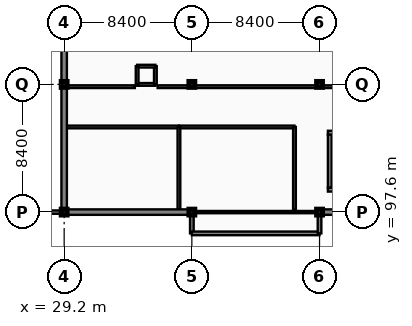
"""IFC4 building model, lengths in metres.
Left out: names, types, materials, properties, quantities, classifications, styles, units other than length and angle.
Written with IfcOpenShell. Run it as: python <this file> out.ifc"""

import sys

from ifc_helpers import new_model, si_unit, direction, frame, frame_2d, origin, origin_2d, place, context, subcontext, project, spatial, rectangle, extrude, element, fill, save


model = new_model("IFC4")
c1 = context("Model", 3, precision=1e-05, world=origin(), true_north=direction((0.0, 1.0)))
c2 = subcontext(c1, "Body", "Model", "MODEL_VIEW")
j1 = project(units=[si_unit("LENGTHUNIT", "METRE"), si_unit("PLANEANGLEUNIT", "RADIAN")], contexts=[c1])
p1 = place(None, origin())
s1 = spatial("IfcSite", under=j1, at=p1, CompositionType="ELEMENT")
p2 = place(p1, origin())
s2 = spatial("IfcBuilding", under=s1, at=p2, CompositionType="ELEMENT")
p3 = place(p2, frame((0.0, 0.0, 13.8)))
s3 = spatial("IfcBuildingStorey", under=s2, at=p3, CompositionType="ELEMENT", Elevation=13.8)
for number, where, z_axis, x_axis in (
    (1, (29.2, 97.6, 0.0), (0.0, 0.0, 1.0), (1.0, 0.0, 0.0)),
    (2, (29.2, 106.0, 0.0), (0.0, 0.0, 1.0), (1.0, 0.0, 0.0)),
    (3, (37.6, 97.6, 0.0), (0.0, 0.0, 1.0), (1.0, 0.0, 0.0)),
    (4, (37.6, 106.0, 0.0), (0.0, 0.0, 1.0), (1.0, 0.0, 0.0)),
    (5, (46.0, 97.6, 0.0), (0.0, 0.0, 1.0), (1.0, 0.0, 0.0)),
    (6, (46.0, 106.0, 0.0), (0.0, 0.0, 1.0), (1.0, 0.0, 0.0)),
):
    element("IfcColumn", number, at=place(p3, frame(where, z_axis=z_axis, x_axis=x_axis)), inside=s3, PredefinedType="COLUMN", context=c2, shape_type="SweptSolid", body=[
        extrude(rectangle(XDim=0.4, YDim=0.4, at=origin_2d()), origin(), (0.0, 0.0, 1.0), 3.9),
    ])
p4 = place(p3, frame((29.34, 103.2, 0.0), z_axis=(0.0, 0.0, 1.0), x_axis=(1.0, 0.0, 0.0)))
e7 = element("IfcWall", 7, at=p4, inside=s3, PredefinedType="PARTITIONING", context=c2, shape_type="SweptSolid", body=[
    extrude(rectangle(XDim=7.41, YDim=0.18, at=frame_2d((3.705, 0.0))), origin(), (0.0, 0.0, 1.0), 3.09),
])
p5 = place(p4, frame((3.205, 0.0, -0.01)))
e8 = element("IfcOpeningElement", 8, at=p5, cuts=e7, PredefinedType="OPENING", context=c2, shape_type="SweptSolid", body=[
    extrude(rectangle(XDim=1.0, YDim=2.16, at=frame_2d((0.5, 1.08))), frame((0.0, 0.1, 0.0), z_axis=(0.0, -1.0, 0.0), x_axis=(1.0, 0.0, 0.0)), (0.0, 0.0, 1.0), 0.2),
])
p6 = place(p3, frame((36.75, 103.2, 0.0), z_axis=(0.0, 0.0, 1.0), x_axis=(1.0, 0.0, 0.0)))
e9 = element("IfcWall", 9, at=p6, inside=s3, PredefinedType="PARTITIONING", context=c2, shape_type="SweptSolid", body=[
    extrude(rectangle(XDim=7.6, YDim=0.18, at=frame_2d((3.8, 0.0))), origin(), (0.0, 0.0, 1.0), 3.31),
])
p7 = place(p6, frame((3.3, 0.0, -0.01)))
e10 = element("IfcOpeningElement", 10, at=p7, cuts=e9, PredefinedType="OPENING", context=c2, shape_type="SweptSolid", body=[
    extrude(rectangle(XDim=1.0, YDim=2.16, at=frame_2d((0.5, 1.08))), frame((0.0, 0.1, 0.0), z_axis=(0.0, -1.0, 0.0), x_axis=(1.0, 0.0, 0.0)), (0.0, 0.0, 1.0), 0.2),
])
p8 = place(p3, frame((36.75, 97.74, 0.0), z_axis=(0.0, 0.0, 1.0), x_axis=(0.0, 1.0, 0.0)))
e11 = element("IfcWall", 11, at=p8, inside=s3, PredefinedType="PARTITIONING", context=c2, shape_type="SweptSolid", body=[
    extrude(rectangle(XDim=5.46, YDim=0.18, at=frame_2d((2.73, 0.0))), origin(), (0.0, 0.0, 1.0), 3.01),
])
p9 = place(p3, frame((44.35, 97.74, 0.0), z_axis=(0.0, 0.0, 1.0), x_axis=(0.0, 1.0, 0.0)))
e12 = element("IfcWall", 12, at=p9, inside=s3, PredefinedType="PARTITIONING", context=c2, shape_type="SweptSolid", body=[
    extrude(rectangle(XDim=5.46, YDim=0.18, at=frame_2d((2.73, 0.0))), origin(), (0.0, 0.0, 1.0), 3.37),
])
p10 = place(p3, frame((37.6, 97.6, 0.0), z_axis=(0.0, 0.0, 1.0), x_axis=(1.0, 0.0, 0.0)))
e13 = element("IfcWall", 13, at=p10, inside=s3, PredefinedType="PARTITIONING", context=c2, shape_type="SweptSolid", body=[
    extrude(rectangle(XDim=8.4, YDim=0.15, at=frame_2d((4.2, 0.0))), origin(), (0.0, 0.0, 1.0), 3.01),
])
p11 = place(p10, frame((2.59, 0.0, -0.01)))
e14 = element("IfcOpeningElement", 14, at=p11, cuts=e13, PredefinedType="OPENING", context=c2, shape_type="SweptSolid", body=[
    extrude(rectangle(XDim=1.0, YDim=2.16, at=frame_2d((0.5, 1.08))), frame((0.0, 0.085, 0.0), z_axis=(0.0, -1.0, 0.0), x_axis=(1.0, 0.0, 0.0)), (0.0, 0.0, 1.0), 0.17),
])
p12 = place(p3, frame((29.34, 105.85, 0.0), z_axis=(0.0, 0.0, 1.0), x_axis=(1.0, 0.0, 0.0)))
e15 = element("IfcWall", 15, at=p12, inside=s3, PredefinedType="PARTITIONING", context=c2, shape_type="SweptSolid", body=[
    extrude(rectangle(XDim=4.51, YDim=0.18, at=frame_2d((2.255, 0.0))), origin(), (0.0, 0.0, 1.0), 3.09),
])
p13 = place(p12, frame((1.31, 0.0, -0.01)))
e16 = element("IfcOpeningElement", 16, at=p13, cuts=e15, PredefinedType="OPENING", context=c2, shape_type="SweptSolid", body=[
    extrude(rectangle(XDim=1.6, YDim=2.21, at=frame_2d((0.8, 1.105))), frame((0.0, 0.1, 0.0), z_axis=(0.0, -1.0, 0.0), x_axis=(1.0, 0.0, 0.0)), (0.0, 0.0, 1.0), 0.2),
])
p14 = place(p3, frame((35.35, 105.85, 0.0), z_axis=(0.0, 0.0, 1.0), x_axis=(1.0, 0.0, 0.0)))
e17 = element("IfcWall", 17, at=p14, inside=s3, PredefinedType="PARTITIONING", context=c2, shape_type="SweptSolid", body=[
    extrude(rectangle(XDim=17.7, YDim=0.18, at=frame_2d((8.85, 0.0))), origin(), (0.0, 0.0, 1.0), 3.15),
])
p15 = place(p3, frame((29.2, 97.6, 0.0), z_axis=(0.0, 0.0, 1.0), x_axis=(1.0, 0.0, 0.0)))
e18 = element("IfcWall", 18, at=p15, inside=s3, PredefinedType="SOLIDWALL", context=c2, shape_type="SweptSolid", body=[
    extrude(rectangle(XDim=8.4, YDim=0.36, at=frame_2d((4.2, 0.0))), origin(), (0.0, 0.0, 1.0), 3.01),
])
p16 = place(p15, frame((0.46, 0.0, 0.75)))
e19 = element("IfcOpeningElement", 19, at=p16, cuts=e18, PredefinedType="OPENING", context=c2, shape_type="SweptSolid", body=[
    extrude(rectangle(XDim=1.55, YDim=2.12, at=frame_2d((0.775, 1.06))), frame((0.0, 0.19, 0.0), z_axis=(0.0, -1.0, 0.0), x_axis=(1.0, 0.0, 0.0)), (0.0, 0.0, 1.0), 0.38),
])
p17 = place(p15, frame((5.66, 0.0, 0.75)))
e20 = element("IfcOpeningElement", 20, at=p17, cuts=e18, PredefinedType="OPENING", context=c2, shape_type="SweptSolid", body=[
    extrude(rectangle(XDim=1.55, YDim=2.12, at=frame_2d((0.775, 1.06))), frame((0.0, 0.19, 0.0), z_axis=(0.0, -1.0, 0.0), x_axis=(1.0, 0.0, 0.0)), (0.0, 0.0, 1.0), 0.38),
])
p18 = place(p3, frame((46.0, 97.6, 0.0), z_axis=(0.0, 0.0, 1.0), x_axis=(1.0, 0.0, 0.0)))
e21 = element("IfcWall", 21, at=p18, inside=s3, PredefinedType="SOLIDWALL", context=c2, shape_type="SweptSolid", body=[
    extrude(rectangle(XDim=4.8, YDim=0.36, at=frame_2d((2.4, 0.0))), origin(), (0.0, 0.0, 1.0), 3.15),
])
p19 = place(p18, frame((0.46, 0.0, 0.75)))
e22 = element("IfcOpeningElement", 22, at=p19, cuts=e21, PredefinedType="OPENING", context=c2, shape_type="SweptSolid", body=[
    extrude(rectangle(XDim=1.55, YDim=2.26, at=frame_2d((0.775, 1.13))), frame((0.0, 0.19, 0.0), z_axis=(0.0, -1.0, 0.0), x_axis=(1.0, 0.0, 0.0)), (0.0, 0.0, 1.0), 0.38),
])
p20 = place(p18, frame((2.66, 0.0, 0.75)))
e23 = element("IfcOpeningElement", 23, at=p20, cuts=e21, PredefinedType="OPENING", context=c2, shape_type="SweptSolid", body=[
    extrude(rectangle(XDim=1.55, YDim=2.26, at=frame_2d((0.775, 1.13))), frame((0.0, 0.19, 0.0), z_axis=(0.0, -1.0, 0.0), x_axis=(1.0, 0.0, 0.0)), (0.0, 0.0, 1.0), 0.38),
])
p21 = place(p3, frame((29.2, 106.0, 0.0), z_axis=(0.0, 0.0, 1.0), x_axis=(0.0, -1.0, 0.0)))
e24 = element("IfcWall", 24, at=p21, inside=s3, PredefinedType="SOLIDWALL", context=c2, shape_type="SweptSolid", body=[
    extrude(rectangle(XDim=8.4, YDim=0.36, at=frame_2d((4.2, 0.0))), origin(), (0.0, 0.0, 1.0), 3.01),
])
p22 = place(p21, frame((0.46, 0.0, 0.75)))
e25 = element("IfcOpeningElement", 25, at=p22, cuts=e24, PredefinedType="OPENING", context=c2, shape_type="SweptSolid", body=[
    extrude(rectangle(XDim=1.55, YDim=2.12, at=frame_2d((0.775, 1.06))), frame((0.0, 0.19, 0.0), z_axis=(0.0, -1.0, 0.0), x_axis=(1.0, 0.0, 0.0)), (0.0, 0.0, 1.0), 0.38),
])
p23 = place(p21, frame((6.26, 0.0, 0.75)))
e26 = element("IfcOpeningElement", 26, at=p23, cuts=e24, PredefinedType="OPENING", context=c2, shape_type="SweptSolid", body=[
    extrude(rectangle(XDim=1.55, YDim=2.12, at=frame_2d((0.775, 1.06))), frame((0.0, 0.19, 0.0), z_axis=(0.0, -1.0, 0.0), x_axis=(1.0, 0.0, 0.0)), (0.0, 0.0, 1.0), 0.38),
])
p24 = place(p3, frame((29.2, 115.0, 0.0), z_axis=(0.0, 0.0, 1.0), x_axis=(0.0, -1.0, 0.0)))
e27 = element("IfcWall", 27, at=p24, inside=s3, PredefinedType="SOLIDWALL", context=c2, shape_type="SweptSolid", body=[
    extrude(rectangle(XDim=9.0, YDim=0.36, at=frame_2d((4.5, 0.0))), origin(), (0.0, 0.0, 1.0), 3.01),
])
p25 = place(p24, frame((0.46, 0.0, 0.75)))
e28 = element("IfcOpeningElement", 28, at=p25, cuts=e27, PredefinedType="OPENING", context=c2, shape_type="SweptSolid", body=[
    extrude(rectangle(XDim=1.55, YDim=2.12, at=frame_2d((0.775, 1.06))), frame((0.0, 0.19, 0.0), z_axis=(0.0, -1.0, 0.0), x_axis=(1.0, 0.0, 0.0)), (0.0, 0.0, 1.0), 0.38),
])
p26 = place(p24, frame((6.86, 0.0, 0.75)))
e29 = element("IfcOpeningElement", 29, at=p26, cuts=e27, PredefinedType="OPENING", context=c2, shape_type="SweptSolid", body=[
    extrude(rectangle(XDim=1.55, YDim=2.12, at=frame_2d((0.775, 1.06))), frame((0.0, 0.19, 0.0), z_axis=(0.0, -1.0, 0.0), x_axis=(1.0, 0.0, 0.0)), (0.0, 0.0, 1.0), 0.38),
])
p27 = place(p3, frame((37.6, 97.45, 0.0), z_axis=(0.0, 0.0, 1.0), x_axis=(0.0, -1.0, 0.0)))
e30 = element("IfcWall", 30, at=p27, inside=s3, PredefinedType="SOLIDWALL", context=c2, shape_type="SweptSolid", body=[
    extrude(rectangle(XDim=1.25, YDim=0.24, at=frame_2d((0.625, 0.0))), origin(), (0.0, 0.0, 1.0), 3.01),
])
p28 = place(p3, frame((37.6, 96.2, 0.0), z_axis=(0.0, 0.0, 1.0), x_axis=(1.0, 0.0, 0.0)))
e31 = element("IfcWall", 31, at=p28, inside=s3, PredefinedType="SOLIDWALL", context=c2, shape_type="SweptSolid", body=[
    extrude(rectangle(XDim=8.4, YDim=0.24, at=frame_2d((4.2, 0.0))), origin(), (0.0, 0.0, 1.0), 3.01),
])
p29 = place(p28, frame((0.46, 0.0, 0.65)))
e32 = element("IfcOpeningElement", 32, at=p29, cuts=e31, PredefinedType="OPENING", context=c2, shape_type="SweptSolid", body=[
    extrude(rectangle(XDim=2.4, YDim=2.15, at=frame_2d((1.2, 1.075))), frame((0.0, 0.13, 0.0), z_axis=(0.0, -1.0, 0.0), x_axis=(1.0, 0.0, 0.0)), (0.0, 0.0, 1.0), 0.26),
])
p30 = place(p28, frame((5.46, 0.0, 0.65)))
e33 = element("IfcOpeningElement", 33, at=p30, cuts=e31, PredefinedType="OPENING", context=c2, shape_type="SweptSolid", body=[
    extrude(rectangle(XDim=2.4, YDim=2.15, at=frame_2d((1.2, 1.075))), frame((0.0, 0.13, 0.0), z_axis=(0.0, -1.0, 0.0), x_axis=(1.0, 0.0, 0.0)), (0.0, 0.0, 1.0), 0.26),
])
p31 = place(p3, frame((46.0, 96.2, 0.0), z_axis=(0.0, 0.0, 1.0), x_axis=(0.0, 1.0, 0.0)))
e34 = element("IfcWall", 34, at=p31, inside=s3, PredefinedType="SOLIDWALL", context=c2, shape_type="SweptSolid", body=[
    extrude(rectangle(XDim=1.25, YDim=0.24, at=frame_2d((0.625, 0.0))), origin(), (0.0, 0.0, 1.0), 3.01),
])
p32 = place(p3, frame((12.4, 97.6, 0.0), z_axis=(0.0, 0.0, 1.0), x_axis=(1.0, 0.0, 0.0)))
e35 = element("IfcWall", 35, at=p32, inside=s3, PredefinedType="PARAPET", context=c2, shape_type="SweptSolid", body=[
    extrude(rectangle(XDim=16.8, YDim=0.22, at=frame_2d((8.4, 0.0))), origin(), (0.0, 0.0, 1.0), 1.15),
])
p33 = place(p3, frame((46.675, 102.7, 0.0), z_axis=(0.0, 0.0, 1.0), x_axis=(0.0, -1.0, 0.0)))
e36 = element("IfcWall", 36, at=p33, inside=s3, PredefinedType="SHEAR", context=c2, shape_type="SweptSolid", body=[
    extrude(rectangle(XDim=3.5, YDim=0.25, at=frame_2d((1.75, 0.0))), origin(), (0.0, 0.0, 1.0), 3.9),
])
p34 = place(p33, frame((1.1, 0.0, -0.01)))
e37 = element("IfcOpeningElement", 37, at=p34, cuts=e36, PredefinedType="OPENING", context=c2, shape_type="SweptSolid", body=[
    extrude(rectangle(XDim=1.3, YDim=2.16, at=frame_2d((0.65, 1.08))), frame((0.0, 0.135, 0.0), z_axis=(0.0, -1.0, 0.0), x_axis=(1.0, 0.0, 0.0)), (0.0, 0.0, 1.0), 0.27),
])
for number, where, z_axis, x_axis in (
    (38, (46.55, 99.075, 0.0), (0.0, 0.0, 1.0), (1.0, 0.0, 0.0)),
    (39, (46.55, 102.825, 0.0), (0.0, 0.0, 1.0), (1.0, 0.0, 0.0)),
):
    element("IfcWall", number, at=place(p3, frame(where, z_axis=z_axis, x_axis=x_axis)), inside=s3, PredefinedType="SHEAR", context=c2, shape_type="SweptSolid", body=[
        extrude(rectangle(XDim=8.9, YDim=0.25, at=frame_2d((4.45, 0.0))), origin(), (0.0, 0.0, 1.0), 3.9),
    ])
p35 = place(p3, frame((34.0, 106.0, 0.0), z_axis=(0.0, 0.0, 1.0), x_axis=(1.0, 0.0, 0.0)))
e40 = element("IfcWall", 40, at=p35, inside=s3, PredefinedType="SOLIDWALL", context=c2, shape_type="SweptSolid", body=[
    extrude(rectangle(XDim=1.2, YDim=0.18, at=frame_2d((0.6, 0.0))), origin(), (0.0, 0.0, 1.0), 3.69),
])
p36 = place(p35, frame((0.2, 0.0, -0.01)))
e41 = element("IfcOpeningElement", 41, at=p36, cuts=e40, PredefinedType="OPENING", context=c2, shape_type="SweptSolid", body=[
    extrude(rectangle(XDim=0.8, YDim=2.06, at=frame_2d((0.4, 1.03))), frame((0.0, 0.1, 0.0), z_axis=(0.0, -1.0, 0.0), x_axis=(1.0, 0.0, 0.0)), (0.0, 0.0, 1.0), 0.2),
])
for number, where, z_axis, x_axis in (
    (42, (35.2, 106.0, 0.0), (0.0, 0.0, 1.0), (0.0, 1.0, 0.0)),
    (43, (35.2, 107.2, 0.0), (0.0, 0.0, 1.0), (-1.0, 0.0, 0.0)),
    (44, (34.0, 107.2, 0.0), (0.0, 0.0, 1.0), (0.0, -1.0, 0.0)),
):
    element("IfcWall", number, at=place(p3, frame(where, z_axis=z_axis, x_axis=x_axis)), inside=s3, PredefinedType="SOLIDWALL", context=c2, shape_type="SweptSolid", body=[
        extrude(rectangle(XDim=1.2, YDim=0.18, at=frame_2d((0.6, 0.0))), origin(), (0.0, 0.0, 1.0), 3.69),
    ])
p37 = place(p5, frame((1.0, 0.0, 0.01), z_axis=(0.0, 0.0, 1.0), x_axis=(-1.0, 0.0, 0.0)))
e45 = element("IfcDoor", 45, at=p37, inside=s3, OperationType="SINGLE_SWING_RIGHT", PredefinedType="DOOR", context=c2, shape_type="SweptSolid", body=[
    extrude(rectangle(XDim=1.0, YDim=2.15, at=frame_2d((0.5, 1.075))), frame((0.0, 0.025, 0.0), z_axis=(0.0, -1.0, 0.0), x_axis=(1.0, 0.0, 0.0)), (0.0, 0.0, 1.0), 0.05),
])
fill(e8, e45)
p38 = place(p7, frame((0.0, 0.0, 0.01)))
e46 = element("IfcDoor", 46, at=p38, inside=s3, OperationType="SINGLE_SWING_LEFT", PredefinedType="DOOR", context=c2, shape_type="SweptSolid", body=[
    extrude(rectangle(XDim=1.0, YDim=2.15, at=frame_2d((0.5, 1.075))), frame((0.0, 0.025, 0.0), z_axis=(0.0, -1.0, 0.0), x_axis=(1.0, 0.0, 0.0)), (0.0, 0.0, 1.0), 0.05),
])
fill(e10, e46)
p39 = place(p11, frame((0.0, 0.0, 0.01)))
e47 = element("IfcDoor", 47, at=p39, inside=s3, OperationType="SINGLE_SWING_LEFT", PredefinedType="DOOR", context=c2, shape_type="SweptSolid", body=[
    extrude(rectangle(XDim=1.0, YDim=2.15, at=frame_2d((0.5, 1.075))), frame((0.0, 0.025, 0.0), z_axis=(0.0, -1.0, 0.0), x_axis=(1.0, 0.0, 0.0)), (0.0, 0.0, 1.0), 0.05),
])
fill(e14, e47)
p40 = place(p13, frame((1.6, 0.0, 0.01), z_axis=(0.0, 0.0, 1.0), x_axis=(-1.0, 0.0, 0.0)))
e48 = element("IfcDoor", 48, at=p40, inside=s3, OperationType="DOUBLE_SWING_LEFT", PredefinedType="DOOR", context=c2, shape_type="SweptSolid", body=[
    extrude(rectangle(XDim=1.6, YDim=2.2, at=frame_2d((0.8, 1.1))), frame((0.0, 0.025, 0.0), z_axis=(0.0, -1.0, 0.0), x_axis=(1.0, 0.0, 0.0)), (0.0, 0.0, 1.0), 0.05),
])
fill(e16, e48)
p41 = place(p16, origin())
e49 = element("IfcWindow", 49, at=p41, inside=s3, PartitioningType="DOUBLE_PANEL_HORIZONTAL", PredefinedType="WINDOW", context=c2, shape_type="SweptSolid", body=[
    extrude(rectangle(XDim=1.55, YDim=2.12, at=frame_2d((0.775, 1.06))), frame((0.0, 0.03, 0.0), z_axis=(0.0, -1.0, 0.0), x_axis=(1.0, 0.0, 0.0)), (0.0, 0.0, 1.0), 0.06),
])
fill(e19, e49)
p42 = place(p17, origin())
e50 = element("IfcWindow", 50, at=p42, inside=s3, PartitioningType="DOUBLE_PANEL_HORIZONTAL", PredefinedType="WINDOW", context=c2, shape_type="SweptSolid", body=[
    extrude(rectangle(XDim=1.55, YDim=2.12, at=frame_2d((0.775, 1.06))), frame((0.0, 0.03, 0.0), z_axis=(0.0, -1.0, 0.0), x_axis=(1.0, 0.0, 0.0)), (0.0, 0.0, 1.0), 0.06),
])
fill(e20, e50)
p43 = place(p19, origin())
e51 = element("IfcWindow", 51, at=p43, inside=s3, PartitioningType="DOUBLE_PANEL_HORIZONTAL", PredefinedType="WINDOW", context=c2, shape_type="SweptSolid", body=[
    extrude(rectangle(XDim=1.55, YDim=2.26, at=frame_2d((0.775, 1.13))), frame((0.0, 0.03, 0.0), z_axis=(0.0, -1.0, 0.0), x_axis=(1.0, 0.0, 0.0)), (0.0, 0.0, 1.0), 0.06),
])
fill(e22, e51)
p44 = place(p22, origin())
e52 = element("IfcWindow", 52, at=p44, inside=s3, PartitioningType="DOUBLE_PANEL_HORIZONTAL", PredefinedType="WINDOW", context=c2, shape_type="SweptSolid", body=[
    extrude(rectangle(XDim=1.55, YDim=2.12, at=frame_2d((0.775, 1.06))), frame((0.0, 0.03, 0.0), z_axis=(0.0, -1.0, 0.0), x_axis=(1.0, 0.0, 0.0)), (0.0, 0.0, 1.0), 0.06),
])
fill(e25, e52)
p45 = place(p23, origin())
e53 = element("IfcWindow", 53, at=p45, inside=s3, PartitioningType="DOUBLE_PANEL_HORIZONTAL", PredefinedType="WINDOW", context=c2, shape_type="SweptSolid", body=[
    extrude(rectangle(XDim=1.55, YDim=2.12, at=frame_2d((0.775, 1.06))), frame((0.0, 0.03, 0.0), z_axis=(0.0, -1.0, 0.0), x_axis=(1.0, 0.0, 0.0)), (0.0, 0.0, 1.0), 0.06),
])
fill(e26, e53)
p46 = place(p26, origin())
e54 = element("IfcWindow", 54, at=p46, inside=s3, PartitioningType="DOUBLE_PANEL_HORIZONTAL", PredefinedType="WINDOW", context=c2, shape_type="SweptSolid", body=[
    extrude(rectangle(XDim=1.55, YDim=2.12, at=frame_2d((0.775, 1.06))), frame((0.0, 0.03, 0.0), z_axis=(0.0, -1.0, 0.0), x_axis=(1.0, 0.0, 0.0)), (0.0, 0.0, 1.0), 0.06),
])
fill(e29, e54)
p47 = place(p29, origin())
e55 = element("IfcWindow", 55, at=p47, inside=s3, PartitioningType="TRIPLE_PANEL_VERTICAL", PredefinedType="WINDOW", context=c2, shape_type="SweptSolid", body=[
    extrude(rectangle(XDim=2.4, YDim=2.15, at=frame_2d((1.2, 1.075))), frame((0.0, 0.03, 0.0), z_axis=(0.0, -1.0, 0.0), x_axis=(1.0, 0.0, 0.0)), (0.0, 0.0, 1.0), 0.06),
])
fill(e32, e55)
p48 = place(p30, origin())
e56 = element("IfcWindow", 56, at=p48, inside=s3, PartitioningType="TRIPLE_PANEL_VERTICAL", PredefinedType="WINDOW", context=c2, shape_type="SweptSolid", body=[
    extrude(rectangle(XDim=2.4, YDim=2.15, at=frame_2d((1.2, 1.075))), frame((0.0, 0.03, 0.0), z_axis=(0.0, -1.0, 0.0), x_axis=(1.0, 0.0, 0.0)), (0.0, 0.0, 1.0), 0.06),
])
fill(e33, e56)
p49 = place(p34, frame((0.0, 0.0, 0.01)))
e57 = element("IfcDoor", 57, at=p49, inside=s3, OperationType="SINGLE_SWING_RIGHT", PredefinedType="DOOR", context=c2, shape_type="SweptSolid", body=[
    extrude(rectangle(XDim=1.3, YDim=2.15, at=frame_2d((0.65, 1.075))), frame((0.0, 0.025, 0.0), z_axis=(0.0, -1.0, 0.0), x_axis=(1.0, 0.0, 0.0)), (0.0, 0.0, 1.0), 0.05),
])
fill(e37, e57)
p50 = place(p36, frame((0.0, 0.0, 0.01)))
e58 = element("IfcDoor", 58, at=p50, inside=s3, OperationType="SINGLE_SWING_LEFT", PredefinedType="DOOR", context=c2, shape_type="SweptSolid", body=[
    extrude(rectangle(XDim=0.8, YDim=2.05, at=frame_2d((0.4, 1.025))), frame((0.0, 0.025, 0.0), z_axis=(0.0, -1.0, 0.0), x_axis=(1.0, 0.0, 0.0)), (0.0, 0.0, 1.0), 0.05),
])
fill(e41, e58)
save(model, sys.argv[1])
